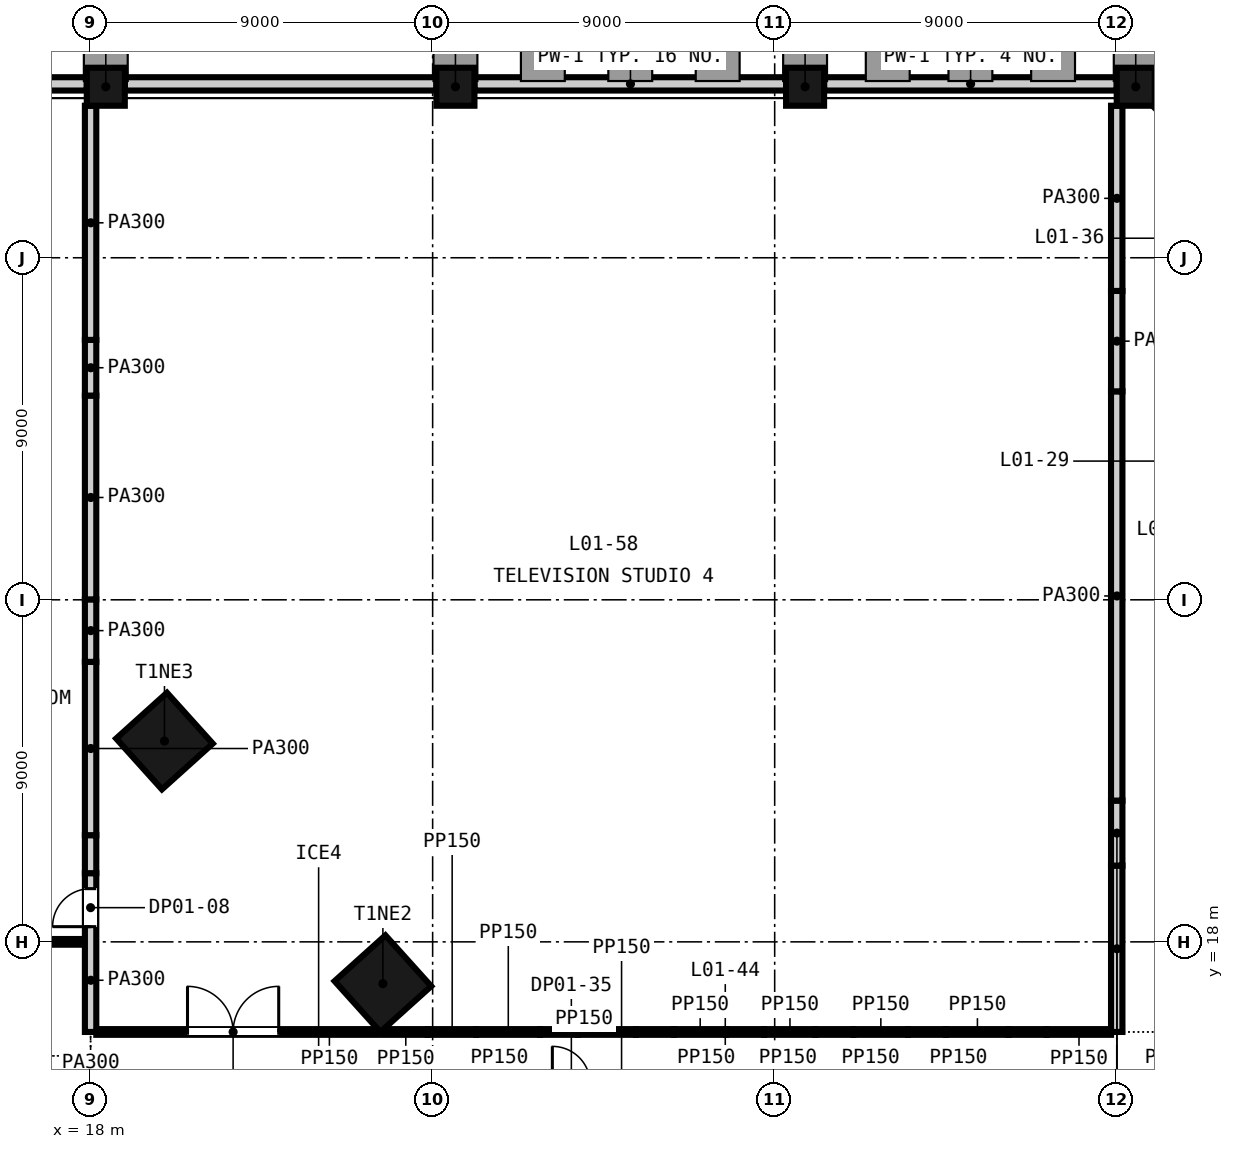
"""IFC4 building model, lengths in metres.
Left out: names, types, materials, properties, quantities, classifications, styles, units other than length and angle.
Written with IfcOpenShell. Run it as: python <this file> out.ifc"""

import sys

from ifc_helpers import new_model, si_unit, direction, frame, frame_2d, origin, origin_2d, place, context, subcontext, project, spatial, rectangle, extrude, element, fill, save


model = new_model("IFC4")
c1 = context("Model", 3, precision=1e-05, world=origin(), true_north=direction((0.0, 1.0)))
c2 = subcontext(c1, "Body", "Model", "MODEL_VIEW")
j1 = project(units=[si_unit("LENGTHUNIT", "METRE"), si_unit("PLANEANGLEUNIT", "RADIAN")], contexts=[c1])
p1 = place(None, origin())
s1 = spatial("IfcSite", under=j1, at=p1, CompositionType="ELEMENT")
p2 = place(p1, origin())
s2 = spatial("IfcBuilding", under=s1, at=p2, CompositionType="ELEMENT")
p3 = place(p2, frame((0.0, 0.0, 9.0)))
s3 = spatial("IfcBuildingStorey", under=s2, at=p3, CompositionType="ELEMENT", Elevation=9.0)
for number, where, z_axis, x_axis in (
    (1, (25.691, 16.9, -0.4), (0.0, 0.0, 1.0), (-0.669, 0.743, 0.0)),
    (2, (19.944, 23.283, -0.4), (0.0, 0.0, 1.0), (-0.669, 0.743, 0.0)),
):
    element("IfcColumn", number, at=place(p3, frame(where, z_axis=z_axis, x_axis=x_axis)), inside=s3, PredefinedType="COLUMN", context=c2, shape_type="SweptSolid", body=[
        extrude(rectangle(XDim=1.8, YDim=1.8, at=origin_2d()), origin(), (0.0, 0.0, 1.0), 9.0),
    ])
for number, where, z_axis, x_axis in (
    (3, (45.5, 40.5, -0.4), (0.0, 0.0, 1.0), (-1.0, 0.0, 0.0)),
    (4, (36.8, 40.5, -0.4), (0.0, 0.0, 1.0), (-1.0, 0.0, 0.0)),
    (5, (27.6, 40.5, -0.4), (0.0, 0.0, 1.0), (-1.0, 0.0, 0.0)),
    (6, (18.4, 40.5, -0.4), (0.0, 0.0, 1.0), (-1.0, 0.0, 0.0)),
):
    element("IfcColumn", number, at=place(p3, frame(where, z_axis=z_axis, x_axis=x_axis)), inside=s3, PredefinedType="COLUMN", context=c2, shape_type="SweptSolid", body=[
        extrude(rectangle(XDim=1.0, YDim=1.0, at=origin_2d()), origin(), (0.0, 0.0, 1.0), 9.0),
    ])
p4 = place(p3, frame((51.327, 35.072, -0.4), z_axis=(0.0, 0.0, 1.0), x_axis=(-0.707106781187, 0.707106781187, 0.0)))
e7 = element("IfcWall", 7, at=p4, inside=s3, PredefinedType="SOLIDWALL", context=c2, shape_type="SweptSolid", body=[
    extrude(rectangle(XDim=7.433, YDim=0.35, at=frame_2d((3.716, 0.0))), origin(), (0.0, 0.0, 1.0), 8.1),
])
p5 = place(p3, frame((45.0, 40.575, -0.4), z_axis=(0.0, 0.0, 1.0), x_axis=(-1.0, 0.0, 0.0)))
e8 = element("IfcWall", 8, at=p5, inside=s3, PredefinedType="SOLIDWALL", context=c2, shape_type="SweptSolid", body=[
    extrude(rectangle(XDim=7.7, YDim=0.35, at=frame_2d((3.85, 0.0))), origin(), (0.0, 0.0, 1.0), 8.1),
])
p6 = place(p3, frame((36.3, 40.575, -0.4), z_axis=(0.0, 0.0, 1.0), x_axis=(-1.0, 0.0, 0.0)))
e9 = element("IfcWall", 9, at=p6, inside=s3, PredefinedType="SOLIDWALL", context=c2, shape_type="SweptSolid", body=[
    extrude(rectangle(XDim=8.2, YDim=0.35, at=frame_2d((4.1, 0.0))), origin(), (0.0, 0.0, 1.0), 8.1),
])
p7 = place(p3, frame((27.1, 40.575, -0.4), z_axis=(0.0, 0.0, 1.0), x_axis=(-1.0, 0.0, 0.0)))
e10 = element("IfcWall", 10, at=p7, inside=s3, PredefinedType="SOLIDWALL", context=c2, shape_type="SweptSolid", body=[
    extrude(rectangle(XDim=8.2, YDim=0.35, at=frame_2d((4.1, 0.0))), origin(), (0.0, 0.0, 1.0), 8.1),
])
p8 = place(p3, frame((17.9, 40.575, -0.4), z_axis=(0.0, 0.0, 1.0), x_axis=(-1.0, 0.0, 0.0)))
e11 = element("IfcWall", 11, at=p8, inside=s3, PredefinedType="SOLIDWALL", context=c2, shape_type="SweptSolid", body=[
    extrude(rectangle(XDim=8.2, YDim=0.35, at=frame_2d((4.1, 0.0))), origin(), (0.0, 0.0, 1.0), 8.1),
])
p9 = place(p3, frame((18.15, 15.629, 0.0), z_axis=(0.0, 0.0, 1.0), x_axis=(1.0, 0.0, 0.0)))
e12 = element("IfcWall", 12, at=p9, inside=s3, PredefinedType="PARTITIONING", context=c2, shape_type="SweptSolid", body=[
    extrude(rectangle(XDim=7.407, YDim=0.15, at=frame_2d((3.704, 0.0))), origin(), (0.0, 0.0, 1.0), 8.6),
])
p10 = place(p9, frame((2.4, 0.0, 0.0)))
e13 = element("IfcOpeningElement", 13, at=p10, cuts=e12, PredefinedType="OPENING", context=c2, shape_type="SweptSolid", body=[
    extrude(rectangle(XDim=2.4, YDim=2.4, at=frame_2d((1.2, 1.2))), frame((0.0, 0.085, 0.0), z_axis=(0.0, -1.0, 0.0), x_axis=(1.0, 0.0, 0.0)), (0.0, 0.0, 1.0), 0.17),
])
p11 = place(p3, frame((25.708, 15.629, 0.0), z_axis=(0.0, 0.0, 1.0), x_axis=(1.0, 0.0, 0.0)))
e14 = element("IfcWall", 14, at=p11, inside=s3, PredefinedType="PARTITIONING", context=c2, shape_type="SweptSolid", body=[
    extrude(rectangle(XDim=1.162, YDim=0.15, at=frame_2d((0.581, 0.0))), origin(), (0.0, 0.0, 1.0), 8.6),
])
p12 = place(p3, frame((26.869, 15.629, 0.0), z_axis=(0.0, 0.0, 1.0), x_axis=(1.0, 0.0, 0.0)))
e15 = element("IfcWall", 15, at=p12, inside=s3, PredefinedType="PARTITIONING", context=c2, shape_type="SweptSolid", body=[
    extrude(rectangle(XDim=1.278, YDim=0.15, at=frame_2d((0.639, 0.0))), origin(), (0.0, 0.0, 1.0), 7.6),
])
p13 = place(p3, frame((28.148, 15.629, 0.0), z_axis=(0.0, 0.0, 1.0), x_axis=(1.0, 0.0, 0.0)))
e16 = element("IfcWall", 16, at=p13, inside=s3, PredefinedType="PARTITIONING", context=c2, shape_type="SweptSolid", body=[
    extrude(rectangle(XDim=1.676, YDim=0.15, at=frame_2d((0.838, 0.0))), origin(), (0.0, 0.0, 1.0), 8.6),
])
p14 = place(p3, frame((29.823, 15.629, 0.0), z_axis=(0.0, 0.0, 1.0), x_axis=(1.0, 0.0, 0.0)))
e17 = element("IfcWall", 17, at=p14, inside=s3, PredefinedType="PARTITIONING", context=c2, shape_type="SweptSolid", body=[
    extrude(rectangle(XDim=1.0, YDim=0.15, at=frame_2d((0.5, 0.0))), origin(), (0.0, 0.0, 1.0), 7.511),
])
p15 = place(p3, frame((30.823, 15.629, 0.0), z_axis=(0.0, 0.0, 1.0), x_axis=(1.0, 0.0, 0.0)))
e18 = element("IfcWall", 18, at=p15, inside=s3, PredefinedType="PARTITIONING", context=c2, shape_type="SweptSolid", body=[
    extrude(rectangle(XDim=1.523, YDim=0.15, at=frame_2d((0.762, 0.0))), origin(), (0.0, 0.0, 1.0), 8.6),
])
p16 = place(p3, frame((32.346, 15.629, 0.0), z_axis=(0.0, 0.0, 1.0), x_axis=(1.0, 0.0, 0.0)))
e19 = element("IfcWall", 19, at=p16, inside=s3, PredefinedType="PARTITIONING", context=c2, shape_type="SweptSolid", body=[
    extrude(rectangle(XDim=1.0, YDim=0.15, at=frame_2d((0.5, 0.0))), origin(), (0.0, 0.0, 1.0), 7.511),
])
p17 = place(p3, frame((33.346, 15.629, 0.0), z_axis=(0.0, 0.0, 1.0), x_axis=(1.0, 0.0, 0.0)))
e20 = element("IfcWall", 20, at=p17, inside=s3, PredefinedType="PARTITIONING", context=c2, shape_type="SweptSolid", body=[
    extrude(rectangle(XDim=1.376, YDim=0.15, at=frame_2d((0.688, 0.0))), origin(), (0.0, 0.0, 1.0), 8.6),
])
p18 = place(p3, frame((34.723, 15.629, 0.0), z_axis=(0.0, 0.0, 1.0), x_axis=(1.0, 0.0, 0.0)))
e21 = element("IfcWall", 21, at=p18, inside=s3, PredefinedType="PARTITIONING", context=c2, shape_type="SweptSolid", body=[
    extrude(rectangle(XDim=1.0, YDim=0.15, at=frame_2d((0.5, 0.0))), origin(), (0.0, 0.0, 1.0), 7.511),
])
p19 = place(p3, frame((35.723, 15.629, 0.0), z_axis=(0.0, 0.0, 1.0), x_axis=(1.0, 0.0, 0.0)))
e22 = element("IfcWall", 22, at=p19, inside=s3, PredefinedType="PARTITIONING", context=c2, shape_type="SweptSolid", body=[
    extrude(rectangle(XDim=1.348, YDim=0.15, at=frame_2d((0.674, 0.0))), origin(), (0.0, 0.0, 1.0), 8.6),
])
p20 = place(p3, frame((37.071, 15.629, 0.0), z_axis=(0.0, 0.0, 1.0), x_axis=(1.0, 0.0, 0.0)))
e23 = element("IfcWall", 23, at=p20, inside=s3, PredefinedType="PARTITIONING", context=c2, shape_type="SweptSolid", body=[
    extrude(rectangle(XDim=1.0, YDim=0.15, at=frame_2d((0.5, 0.0))), origin(), (0.0, 0.0, 1.0), 7.511),
])
p21 = place(p3, frame((38.071, 15.629, 0.0), z_axis=(0.0, 0.0, 1.0), x_axis=(1.0, 0.0, 0.0)))
e24 = element("IfcWall", 24, at=p21, inside=s3, PredefinedType="PARTITIONING", context=c2, shape_type="SweptSolid", body=[
    extrude(rectangle(XDim=1.434, YDim=0.15, at=frame_2d((0.717, 0.0))), origin(), (0.0, 0.0, 1.0), 8.6),
])
p22 = place(p3, frame((39.505, 15.629, 0.0), z_axis=(0.0, 0.0, 1.0), x_axis=(1.0, 0.0, 0.0)))
e25 = element("IfcWall", 25, at=p22, inside=s3, PredefinedType="PARTITIONING", context=c2, shape_type="SweptSolid", body=[
    extrude(rectangle(XDim=1.0, YDim=0.15, at=frame_2d((0.5, 0.0))), origin(), (0.0, 0.0, 1.0), 7.511),
])
p23 = place(p3, frame((40.505, 15.629, 0.0), z_axis=(0.0, 0.0, 1.0), x_axis=(1.0, 0.0, 0.0)))
e26 = element("IfcWall", 26, at=p23, inside=s3, PredefinedType="PARTITIONING", context=c2, shape_type="SweptSolid", body=[
    extrude(rectangle(XDim=1.649, YDim=0.15, at=frame_2d((0.825, 0.0))), origin(), (0.0, 0.0, 1.0), 8.6),
])
p24 = place(p3, frame((42.154, 15.629, 0.0), z_axis=(0.0, 0.0, 1.0), x_axis=(1.0, 0.0, 0.0)))
e27 = element("IfcWall", 27, at=p24, inside=s3, PredefinedType="PARTITIONING", context=c2, shape_type="SweptSolid", body=[
    extrude(rectangle(XDim=1.0, YDim=0.15, at=frame_2d((0.5, 0.0))), origin(), (0.0, 0.0, 1.0), 7.511),
])
p25 = place(p3, frame((43.154, 15.629, 0.0), z_axis=(0.0, 0.0, 1.0), x_axis=(1.0, 0.0, 0.0)))
e28 = element("IfcWall", 28, at=p25, inside=s3, PredefinedType="PARTITIONING", context=c2, shape_type="SweptSolid", body=[
    extrude(rectangle(XDim=1.696, YDim=0.15, at=frame_2d((0.848, 0.0))), origin(), (0.0, 0.0, 1.0), 8.6),
])
p26 = place(p3, frame((-17.85, 18.0, 0.0), z_axis=(0.0, 0.0, 1.0), x_axis=(1.0, 0.0, 0.0)))
e29 = element("IfcWall", 29, at=p26, inside=s3, PredefinedType="PARTITIONING", context=c2, shape_type="SweptSolid", body=[
    extrude(rectangle(XDim=35.7, YDim=0.15, at=frame_2d((17.85, 0.0))), origin(), (0.0, 0.0, 1.0), 8.6),
])
p27 = place(p26, frame((17.25, 0.0, 0.0)))
e30 = element("IfcOpeningElement", 30, at=p27, cuts=e29, PredefinedType="OPENING", context=c2, shape_type="SweptSolid", body=[
    extrude(rectangle(XDim=1.0, YDim=2.1, at=frame_2d((0.5, 1.05))), frame((0.0, 0.085, 0.0), z_axis=(0.0, -1.0, 0.0), x_axis=(1.0, 0.0, 0.0)), (0.0, 0.0, 1.0), 0.17),
])
p28 = place(p3, frame((18.0, 15.629, 0.0), z_axis=(0.0, 0.0, 1.0), x_axis=(0.0, 1.0, 0.0)))
e31 = element("IfcWall", 31, at=p28, inside=s3, PredefinedType="PARTITIONING", context=c2, shape_type="SweptSolid", body=[
    extrude(rectangle(XDim=4.178, YDim=0.3, at=frame_2d((2.089, 0.0))), origin(), (0.0, 0.0, 1.0), 8.6),
])
p29 = place(p28, frame((2.771, 0.0, 0.0)))
e32 = element("IfcOpeningElement", 32, at=p29, cuts=e31, PredefinedType="OPENING", context=c2, shape_type="SweptSolid", body=[
    extrude(rectangle(XDim=1.0, YDim=2.1, at=frame_2d((0.5, 1.05))), frame((0.0, 0.16, 0.0), z_axis=(0.0, -1.0, 0.0), x_axis=(1.0, 0.0, 0.0)), (0.0, 0.0, 1.0), 0.32),
])
p30 = place(p3, frame((18.0, 19.807, 0.0), z_axis=(0.0, 0.0, 1.0), x_axis=(0.0, 1.0, 0.0)))
e33 = element("IfcWall", 33, at=p30, inside=s3, PredefinedType="PARTITIONING", context=c2, shape_type="SweptSolid", body=[
    extrude(rectangle(XDim=1.0, YDim=0.3, at=frame_2d((0.5, 0.0))), origin(), (0.0, 0.0, 1.0), 7.997),
])
p31 = place(p3, frame((18.0, 20.807, 0.0), z_axis=(0.0, 0.0, 1.0), x_axis=(0.0, 1.0, 0.0)))
e34 = element("IfcWall", 34, at=p31, inside=s3, PredefinedType="PARTITIONING", context=c2, shape_type="SweptSolid", body=[
    extrude(rectangle(XDim=4.56, YDim=0.3, at=frame_2d((2.28, 0.0))), origin(), (0.0, 0.0, 1.0), 8.6),
])
p32 = place(p3, frame((18.0, 25.367, 0.0), z_axis=(0.0, 0.0, 1.0), x_axis=(0.0, 1.0, 0.0)))
e35 = element("IfcWall", 35, at=p32, inside=s3, PredefinedType="PARTITIONING", context=c2, shape_type="SweptSolid", body=[
    extrude(rectangle(XDim=1.644, YDim=0.3, at=frame_2d((0.822, 0.0))), origin(), (0.0, 0.0, 1.0), 7.6),
])
p33 = place(p3, frame((18.0, 27.011, 0.0), z_axis=(0.0, 0.0, 1.0), x_axis=(0.0, 1.0, 0.0)))
e36 = element("IfcWall", 36, at=p33, inside=s3, PredefinedType="PARTITIONING", context=c2, shape_type="SweptSolid", body=[
    extrude(rectangle(XDim=5.362, YDim=0.3, at=frame_2d((2.681, 0.0))), origin(), (0.0, 0.0, 1.0), 8.6),
])
p34 = place(p3, frame((18.0, 32.374, 0.0), z_axis=(0.0, 0.0, 1.0), x_axis=(0.0, 1.0, 0.0)))
e37 = element("IfcWall", 37, at=p34, inside=s3, PredefinedType="PARTITIONING", context=c2, shape_type="SweptSolid", body=[
    extrude(rectangle(XDim=1.465, YDim=0.3, at=frame_2d((0.733, 0.0))), origin(), (0.0, 0.0, 1.0), 7.511),
])
p35 = place(p3, frame((18.0, 33.839, 0.0), z_axis=(0.0, 0.0, 1.0), x_axis=(0.0, 1.0, 0.0)))
e38 = element("IfcWall", 38, at=p35, inside=s3, PredefinedType="PARTITIONING", context=c2, shape_type="SweptSolid", body=[
    extrude(rectangle(XDim=6.161, YDim=0.3, at=frame_2d((3.081, 0.0))), origin(), (0.0, 0.0, 1.0), 8.6),
])
p36 = place(p3, frame((45.0, 15.629, 0.0), z_axis=(0.0, 0.0, 1.0), x_axis=(0.0, 1.0, 0.0)))
e39 = element("IfcWall", 39, at=p36, inside=s3, PredefinedType="PARTITIONING", context=c2, shape_type="SweptSolid", body=[
    extrude(rectangle(XDim=4.376, YDim=0.3, at=frame_2d((2.188, 0.0))), origin(), (0.0, 0.0, 1.0), 8.6),
])
p37 = place(p3, frame((45.0, 20.006, 0.0), z_axis=(0.0, 0.0, 1.0), x_axis=(0.0, 1.0, 0.0)))
e40 = element("IfcWall", 40, at=p37, inside=s3, PredefinedType="PARTITIONING", context=c2, shape_type="SweptSolid", body=[
    extrude(rectangle(XDim=1.711, YDim=0.3, at=frame_2d((0.855, 0.0))), origin(), (0.0, 0.0, 1.0), 7.511),
])
p38 = place(p3, frame((45.0, 21.717, 0.0), z_axis=(0.0, 0.0, 1.0), x_axis=(0.0, 1.0, 0.0)))
e41 = element("IfcWall", 41, at=p38, inside=s3, PredefinedType="PARTITIONING", context=c2, shape_type="SweptSolid", body=[
    extrude(rectangle(XDim=10.768, YDim=0.3, at=frame_2d((5.384, 0.0))), origin(), (0.0, 0.0, 1.0), 8.6),
])
p39 = place(p3, frame((45.0, 32.485, 0.0), z_axis=(0.0, 0.0, 1.0), x_axis=(0.0, 1.0, 0.0)))
e42 = element("IfcWall", 42, at=p39, inside=s3, PredefinedType="PARTITIONING", context=c2, shape_type="SweptSolid", body=[
    extrude(rectangle(XDim=2.642, YDim=0.3, at=frame_2d((1.321, 0.0))), origin(), (0.0, 0.0, 1.0), 7.511),
])
p40 = place(p3, frame((45.0, 35.127, 0.0), z_axis=(0.0, 0.0, 1.0), x_axis=(0.0, 1.0, 0.0)))
e43 = element("IfcWall", 43, at=p40, inside=s3, PredefinedType="PARTITIONING", context=c2, shape_type="SweptSolid", body=[
    extrude(rectangle(XDim=4.873, YDim=0.3, at=frame_2d((2.437, 0.0))), origin(), (0.0, 0.0, 1.0), 8.6),
])
p41 = place(p29, origin())
e44 = element("IfcDoor", 44, at=p41, inside=s3, OperationType="SINGLE_SWING_LEFT", PredefinedType="DOOR", context=c2, shape_type="SweptSolid", body=[
    extrude(rectangle(XDim=1.0, YDim=2.1, at=frame_2d((0.5, 1.05))), frame((0.0, 0.025, 0.0), z_axis=(0.0, -1.0, 0.0), x_axis=(1.0, 0.0, 0.0)), (0.0, 0.0, 1.0), 0.05),
])
fill(e32, e44)
p42 = place(p10, origin())
e45 = element("IfcDoor", 45, at=p42, inside=s3, OperationType="SINGLE_SWING_LEFT", PredefinedType="DOOR", context=c2, shape_type="SweptSolid", body=[
    extrude(rectangle(XDim=2.4, YDim=2.4, at=frame_2d((1.2, 1.2))), frame((0.0, 0.025, 0.0), z_axis=(0.0, -1.0, 0.0), x_axis=(1.0, 0.0, 0.0)), (0.0, 0.0, 1.0), 0.05),
])
fill(e13, e45)
save(model, sys.argv[1])
